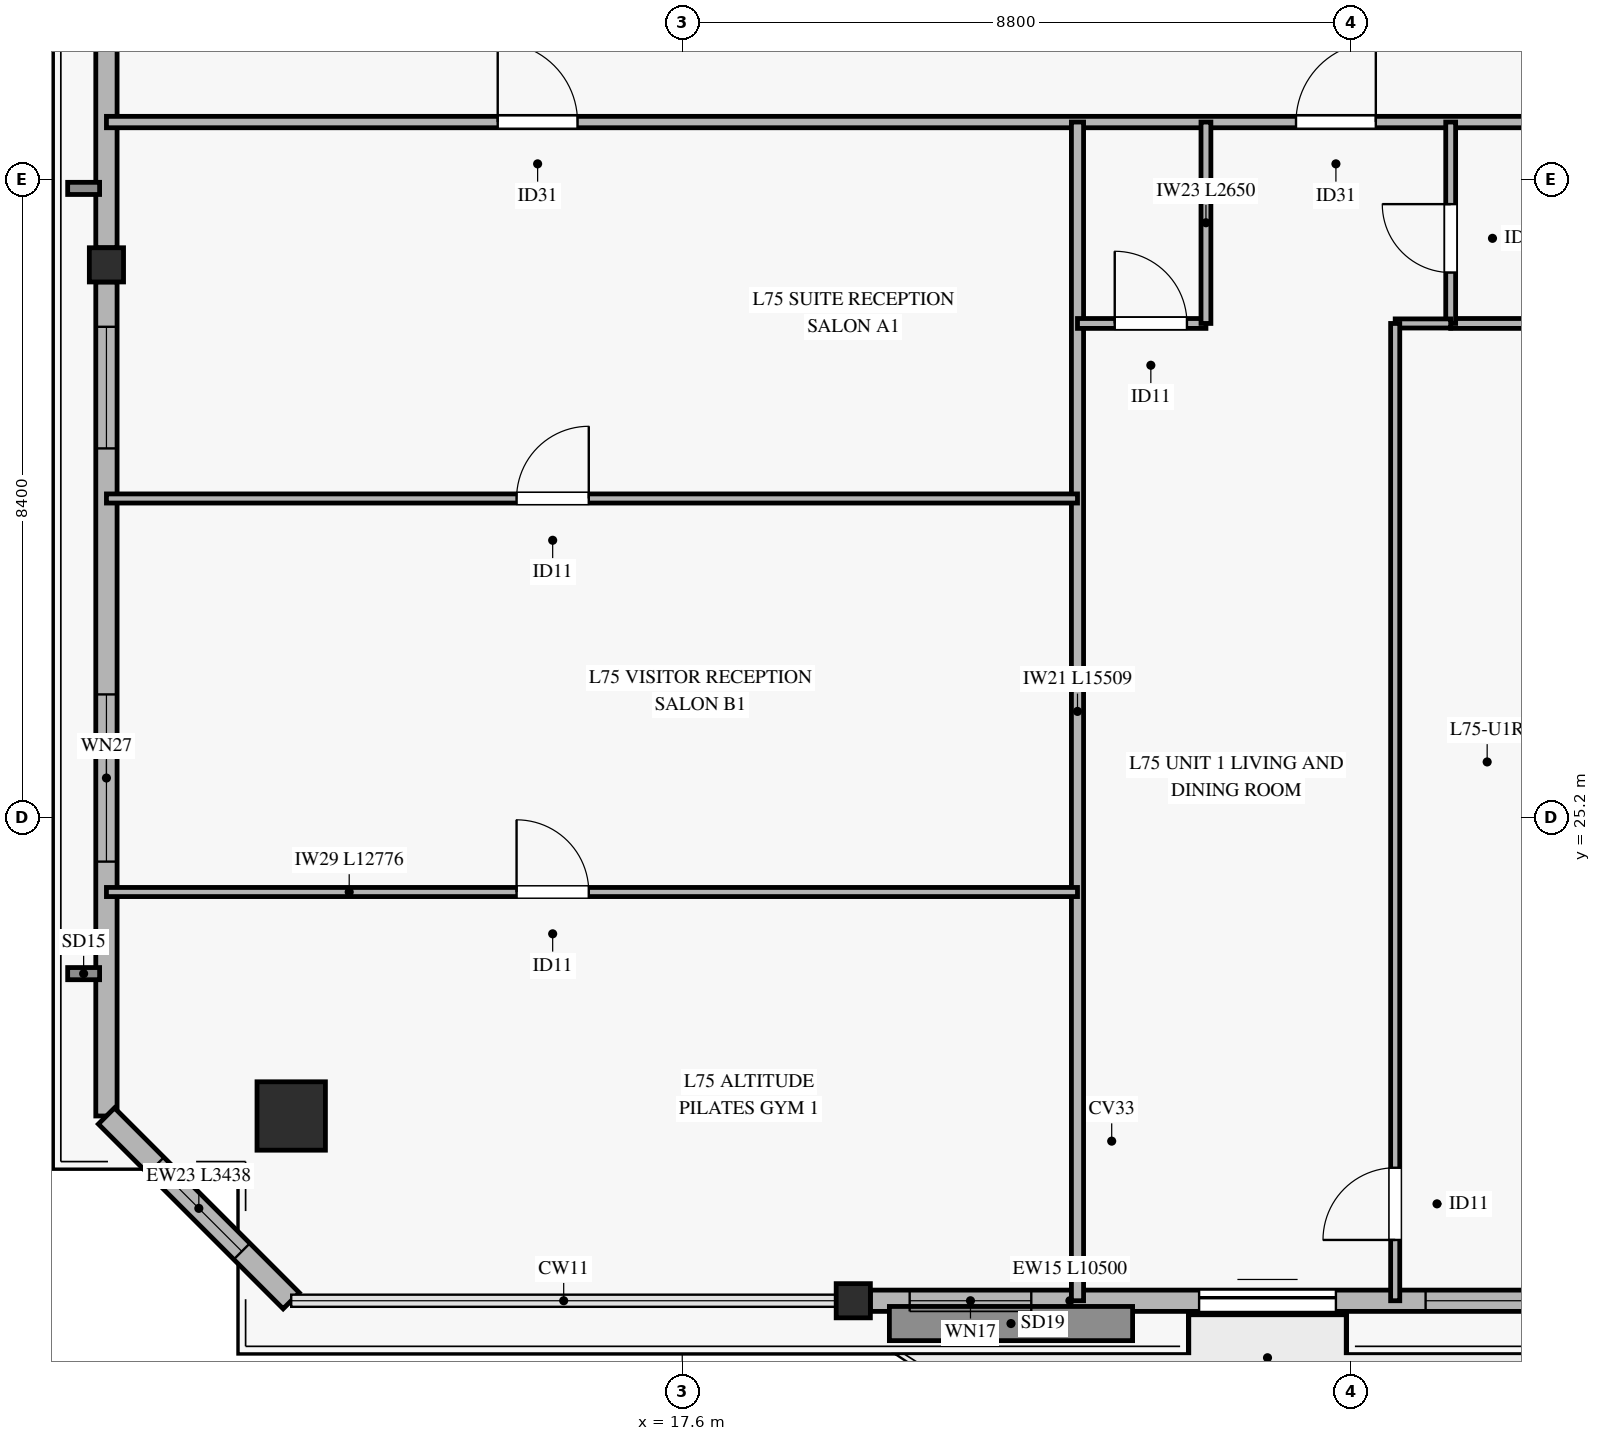
"""IFC4 building model, lengths in metres.
Left out: names, types, materials, properties, quantities, classifications, styles, units other than length and angle.
Written with IfcOpenShell. Run it as: python <this file> out.ifc"""

import sys

from ifc_helpers import new_model, si_unit, direction, frame, frame_2d, origin, origin_2d, place, context, subcontext, project, spatial, rectangle, hollow_rectangle, extrude, source, transform, mapped, element, fill, save


model = new_model("IFC4")
c1 = context("Model", 3, precision=1e-05, world=origin(), true_north=direction((0.0, 1.0)))
c2 = subcontext(c1, "Body", "Model", "MODEL_VIEW")
j1 = project(units=[si_unit("LENGTHUNIT", "METRE"), si_unit("PLANEANGLEUNIT", "RADIAN")], contexts=[c1])
p1 = place(None, origin())
s1 = spatial("IfcSite", under=j1, at=p1, CompositionType="ELEMENT")
p2 = place(p1, origin())
s2 = spatial("IfcBuilding", under=s1, at=p2, CompositionType="ELEMENT")
p3 = place(p2, frame((0.0, 0.0, 293.8)))
s3 = spatial("IfcBuildingStorey", under=s2, at=p3, CompositionType="ELEMENT", Elevation=293.8)
m1 = source(origin(), c2, "Body", "SweptSolid", [
    extrude(hollow_rectangle(XDim=0.9, YDim=0.9, WallThickness=0.04, at=origin_2d()), origin(), (0.0, 0.0, 1.0), 3.185),
])
p4 = place(p3, frame((12.455, 21.272, 0.0), z_axis=(0.0, 0.0, 1.0), x_axis=(1.0, 0.0, 0.0)))
e1 = element("IfcColumn", 1, at=p4, inside=s3, PredefinedType="COLUMN", context=c2, shape_type="MappedRepresentation", body=[
    mapped(m1, transform((0.0, 0.0, 0.0), x_axis=(1.0, 0.0, 0.0), y_axis=(0.0, 1.0, 0.0), z_axis=(0.0, 0.0, 1.0), scale=1.0)),
])
m2 = source(origin(), c2, "Body", "SweptSolid", [
    extrude(hollow_rectangle(XDim=0.45, YDim=0.45, WallThickness=0.022, at=origin_2d()), origin(), (0.0, 0.0, 1.0), 3.185),
])
for number, where, z_axis, x_axis in (
    (2, (19.85, 18.841, 0.0), (0.0, 0.0, 1.0), (1.0, 0.0, 0.0)),
    (3, (10.024, 32.471, 0.0), (0.0, 0.0, 1.0), (1.0, 0.0, 0.0)),
):
    element("IfcColumn", number, at=place(p3, frame(where, z_axis=z_axis, x_axis=x_axis)), inside=s3, PredefinedType="COLUMN", context=c2, shape_type="MappedRepresentation", body=[
        mapped(m2, transform((0.0, 0.0, 0.0), x_axis=(1.0, 0.0, 0.0), y_axis=(0.0, 1.0, 0.0), z_axis=(0.0, 0.0, 1.0), scale=1.0)),
    ])
p5 = place(p3, frame((20.075, 18.841, 0.0), z_axis=(0.0, 0.0, 1.0), x_axis=(1.0, 0.0, 0.0)))
e4 = element("IfcWall", 4, at=p5, inside=s3, PredefinedType="SOLIDWALL", context=c2, shape_type="SweptSolid", body=[
    extrude(rectangle(XDim=10.5, YDim=0.28, at=frame_2d((5.25, 0.0))), origin(), (0.0, 0.0, 1.0), 2.815),
])
p6 = place(p5, frame((4.325, 0.0, 0.0)))
e5 = element("IfcOpeningElement", 5, at=p6, cuts=e4, PredefinedType="OPENING", context=c2, shape_type="SweptSolid", body=[
    extrude(rectangle(XDim=1.8, YDim=2.25, at=frame_2d((0.9, 1.125))), frame((0.0, 0.15, 0.0), z_axis=(0.0, -1.0, 0.0), x_axis=(1.0, 0.0, 0.0)), (0.0, 0.0, 1.0), 0.3),
])
p7 = place(p5, frame((0.517, 0.0, 0.45)))
e6 = element("IfcOpeningElement", 6, at=p7, cuts=e4, PredefinedType="OPENING", context=c2, shape_type="SweptSolid", body=[
    extrude(rectangle(XDim=1.6, YDim=2.0, at=frame_2d((0.8, 1.0))), frame((0.0, 0.15, 0.0), z_axis=(0.0, -1.0, 0.0), x_axis=(1.0, 0.0, 0.0)), (0.0, 0.0, 1.0), 0.3),
])
p8 = place(p5, frame((7.305, 0.0, 0.45)))
e7 = element("IfcOpeningElement", 7, at=p8, cuts=e4, PredefinedType="OPENING", context=c2, shape_type="SweptSolid", body=[
    extrude(rectangle(XDim=1.6, YDim=2.0, at=frame_2d((0.8, 1.0))), frame((0.0, 0.15, 0.0), z_axis=(0.0, -1.0, 0.0), x_axis=(1.0, 0.0, 0.0)), (0.0, 0.0, 1.0), 0.3),
])
p9 = place(p3, frame((10.024, 21.272, 0.0), z_axis=(0.0, 0.0, 1.0), x_axis=(0.0, 1.0, 0.0)))
e8 = element("IfcWall", 8, at=p9, inside=s3, PredefinedType="SOLIDWALL", context=c2, shape_type="SweptSolid", body=[
    extrude(rectangle(XDim=10.974, YDim=0.28, at=frame_2d((5.487, 0.0))), origin(), (0.0, 0.0, 1.0), 2.815),
])
p10 = place(p9, frame((3.347, 0.0, 0.45)))
e9 = element("IfcOpeningElement", 9, at=p10, cuts=e8, PredefinedType="OPENING", context=c2, shape_type="SweptSolid", body=[
    extrude(rectangle(XDim=2.2, YDim=2.1, at=frame_2d((1.1, 1.05))), frame((0.0, 0.15, 0.0), z_axis=(0.0, -1.0, 0.0), x_axis=(1.0, 0.0, 0.0)), (0.0, 0.0, 1.0), 0.3),
])
p11 = place(p9, frame((8.784, 0.0, 0.45)))
e10 = element("IfcOpeningElement", 10, at=p11, cuts=e8, PredefinedType="OPENING", context=c2, shape_type="SweptSolid", body=[
    extrude(rectangle(XDim=1.6, YDim=2.0, at=frame_2d((0.8, 1.0))), frame((0.0, 0.15, 0.0), z_axis=(0.0, -1.0, 0.0), x_axis=(1.0, 0.0, 0.0)), (0.0, 0.0, 1.0), 0.3),
])
p12 = place(p3, frame((10.024, 32.696, 0.0), z_axis=(0.0, 0.0, 1.0), x_axis=(0.0, 1.0, 0.0)))
e11 = element("IfcWall", 11, at=p12, inside=s3, PredefinedType="SOLIDWALL", context=c2, shape_type="SweptSolid", body=[
    extrude(rectangle(XDim=10.973, YDim=0.28, at=frame_2d((5.486, 0.0))), origin(), (0.0, 0.0, 1.0), 2.815),
])
p13 = place(p3, frame((10.024, 21.272, 0.0), z_axis=(0.0, 0.0, 1.0), x_axis=(0.707142286536, -0.707071274055, 0.0)))
e12 = element("IfcWall", 12, at=p13, inside=s3, PredefinedType="SOLIDWALL", context=c2, shape_type="SweptSolid", body=[
    extrude(rectangle(XDim=3.438, YDim=0.3, at=frame_2d((1.719, 0.0))), origin(), (0.0, 0.0, 1.0), 2.815),
])
p14 = place(p13, frame((0.919, 0.0, 0.45)))
e13 = element("IfcOpeningElement", 13, at=p14, cuts=e12, PredefinedType="OPENING", context=c2, shape_type="SweptSolid", body=[
    extrude(rectangle(XDim=1.6, YDim=2.0, at=frame_2d((0.8, 1.0))), frame((0.0, 0.16, 0.0), z_axis=(0.0, -1.0, 0.0), x_axis=(1.0, 0.0, 0.0)), (0.0, 0.0, 1.0), 0.32),
])
p15 = place(p3, frame((10.024, 34.35, 0.0), z_axis=(0.0, 0.0, 1.0), x_axis=(1.0, 0.0, 0.0)))
e14 = element("IfcWall", 14, at=p15, inside=s3, PredefinedType="PARTITIONING", context=c2, shape_type="SweptSolid", body=[
    extrude(rectangle(XDim=50.352, YDim=0.15, at=frame_2d((25.176, 0.0))), origin(), (0.0, 0.0, 1.0), 2.47),
])
p16 = place(p15, frame((5.148, 0.0, 0.0)))
e15 = element("IfcOpeningElement", 15, at=p16, cuts=e14, PredefinedType="OPENING", context=c2, shape_type="SweptSolid", body=[
    extrude(rectangle(XDim=1.05, YDim=2.15, at=frame_2d((0.525, 1.075))), frame((0.0, 0.085, 0.0), z_axis=(0.0, -1.0, 0.0), x_axis=(1.0, 0.0, 0.0)), (0.0, 0.0, 1.0), 0.17),
])
p17 = place(p15, frame((15.651, 0.0, 0.0)))
e16 = element("IfcOpeningElement", 16, at=p17, cuts=e14, PredefinedType="OPENING", context=c2, shape_type="SweptSolid", body=[
    extrude(rectangle(XDim=1.05, YDim=2.15, at=frame_2d((0.525, 1.075))), frame((0.0, 0.085, 0.0), z_axis=(0.0, -1.0, 0.0), x_axis=(1.0, 0.0, 0.0)), (0.0, 0.0, 1.0), 0.17),
])
p18 = place(p15, frame((22.129, 0.0, 0.0)))
e17 = element("IfcOpeningElement", 17, at=p18, cuts=e14, PredefinedType="OPENING", context=c2, shape_type="SweptSolid", body=[
    extrude(rectangle(XDim=1.05, YDim=2.15, at=frame_2d((0.525, 1.075))), frame((0.0, 0.085, 0.0), z_axis=(0.0, -1.0, 0.0), x_axis=(1.0, 0.0, 0.0)), (0.0, 0.0, 1.0), 0.17),
])
p19 = place(p15, frame((29.151, 0.0, 0.0)))
e18 = element("IfcOpeningElement", 18, at=p19, cuts=e14, PredefinedType="OPENING", context=c2, shape_type="SweptSolid", body=[
    extrude(rectangle(XDim=1.05, YDim=2.15, at=frame_2d((0.525, 1.075))), frame((0.0, 0.085, 0.0), z_axis=(0.0, -1.0, 0.0), x_axis=(1.0, 0.0, 0.0)), (0.0, 0.0, 1.0), 0.17),
])
p20 = place(p15, frame((35.701, 0.0, 0.0)))
e19 = element("IfcOpeningElement", 19, at=p20, cuts=e14, PredefinedType="OPENING", context=c2, shape_type="SweptSolid", body=[
    extrude(rectangle(XDim=1.05, YDim=2.15, at=frame_2d((0.525, 1.075))), frame((0.0, 0.085, 0.0), z_axis=(0.0, -1.0, 0.0), x_axis=(1.0, 0.0, 0.0)), (0.0, 0.0, 1.0), 0.17),
])
p21 = place(p15, frame((43.578, 0.0, 0.0)))
e20 = element("IfcOpeningElement", 20, at=p21, cuts=e14, PredefinedType="OPENING", context=c2, shape_type="SweptSolid", body=[
    extrude(rectangle(XDim=1.05, YDim=2.15, at=frame_2d((0.525, 1.075))), frame((0.0, 0.085, 0.0), z_axis=(0.0, -1.0, 0.0), x_axis=(1.0, 0.0, 0.0)), (0.0, 0.0, 1.0), 0.17),
])
p22 = place(p3, frame((22.8, 18.841, 0.0), z_axis=(0.0, 0.0, 1.0), x_axis=(0.0, 1.0, 0.0)))
e21 = element("IfcWall", 21, at=p22, inside=s3, PredefinedType="PARTITIONING", context=c2, shape_type="SweptSolid", body=[
    extrude(rectangle(XDim=15.509, YDim=0.16, at=frame_2d((7.754, 0.0))), origin(), (0.0, 0.0, 1.0), 2.77),
])
p23 = place(p3, frame((10.024, 24.219, 0.0), z_axis=(0.0, 0.0, 1.0), x_axis=(1.0, 0.0, 0.0)))
e22 = element("IfcWall", 22, at=p23, inside=s3, PredefinedType="PARTITIONING", context=c2, shape_type="SweptSolid", body=[
    extrude(rectangle(XDim=12.776, YDim=0.12, at=frame_2d((6.388, 0.0))), origin(), (0.0, 0.0, 1.0), 2.47),
])
p24 = place(p23, frame((5.396, 0.0, 0.0)))
e23 = element("IfcOpeningElement", 23, at=p24, cuts=e22, PredefinedType="OPENING", context=c2, shape_type="SweptSolid", body=[
    extrude(rectangle(XDim=0.95, YDim=2.1, at=frame_2d((0.475, 1.05))), frame((0.0, 0.07, 0.0), z_axis=(0.0, -1.0, 0.0), x_axis=(1.0, 0.0, 0.0)), (0.0, 0.0, 1.0), 0.14),
])
p25 = place(p3, frame((10.024, 29.397, 0.0), z_axis=(0.0, 0.0, 1.0), x_axis=(1.0, 0.0, 0.0)))
e24 = element("IfcWall", 24, at=p25, inside=s3, PredefinedType="PARTITIONING", context=c2, shape_type="SweptSolid", body=[
    extrude(rectangle(XDim=12.776, YDim=0.12, at=frame_2d((6.388, 0.0))), origin(), (0.0, 0.0, 1.0), 2.47),
])
p26 = place(p25, frame((5.396, 0.0, 0.0)))
e25 = element("IfcOpeningElement", 25, at=p26, cuts=e24, PredefinedType="OPENING", context=c2, shape_type="SweptSolid", body=[
    extrude(rectangle(XDim=0.95, YDim=2.1, at=frame_2d((0.475, 1.05))), frame((0.0, 0.07, 0.0), z_axis=(0.0, -1.0, 0.0), x_axis=(1.0, 0.0, 0.0)), (0.0, 0.0, 1.0), 0.14),
])
p27 = place(p3, frame((22.8, 31.7, 0.0), z_axis=(0.0, 0.0, 1.0), x_axis=(1.0, 0.0, 0.0)))
e26 = element("IfcWall", 26, at=p27, inside=s3, PredefinedType="PARTITIONING", context=c2, shape_type="SweptSolid", body=[
    extrude(rectangle(XDim=1.69, YDim=0.13, at=frame_2d((0.845, 0.0))), origin(), (0.0, 0.0, 1.0), 3.185),
])
p28 = place(p27, frame((0.49, 0.0, 0.0)))
e27 = element("IfcOpeningElement", 27, at=p28, cuts=e26, PredefinedType="OPENING", context=c2, shape_type="SweptSolid", body=[
    extrude(rectangle(XDim=0.95, YDim=2.1, at=frame_2d((0.475, 1.05))), frame((0.0, 0.075, 0.0), z_axis=(0.0, -1.0, 0.0), x_axis=(1.0, 0.0, 0.0)), (0.0, 0.0, 1.0), 0.15),
])
p29 = place(p3, frame((24.49, 31.7, 0.0), z_axis=(0.0, 0.0, 1.0), x_axis=(0.0, 1.0, 0.0)))
e28 = element("IfcWall", 28, at=p29, inside=s3, PredefinedType="PARTITIONING", context=c2, shape_type="SweptSolid", body=[
    extrude(rectangle(XDim=2.65, YDim=0.13, at=frame_2d((1.325, 0.0))), origin(), (0.0, 0.0, 1.0), 2.77),
])
p30 = place(p3, frame((27.71, 31.7, 0.0), z_axis=(0.0, 0.0, 1.0), x_axis=(1.0, 0.0, 0.0)))
e29 = element("IfcWall", 29, at=p30, inside=s3, PredefinedType="PARTITIONING", context=c2, shape_type="SweptSolid", body=[
    extrude(rectangle(XDim=1.69, YDim=0.13, at=frame_2d((0.845, 0.0))), origin(), (0.0, 0.0, 1.0), 3.185),
])
p31 = place(p3, frame((27.71, 31.7, 0.0), z_axis=(0.0, 0.0, 1.0), x_axis=(0.0, 1.0, 0.0)))
e30 = element("IfcWall", 30, at=p31, inside=s3, PredefinedType="PARTITIONING", context=c2, shape_type="SweptSolid", body=[
    extrude(rectangle(XDim=2.65, YDim=0.13, at=frame_2d((1.325, 0.0))), origin(), (0.0, 0.0, 1.0), 2.77),
])
p32 = place(p31, frame((0.67, 0.0, 0.0)))
e31 = element("IfcOpeningElement", 31, at=p32, cuts=e30, PredefinedType="OPENING", context=c2, shape_type="SweptSolid", body=[
    extrude(rectangle(XDim=0.9, YDim=2.1, at=frame_2d((0.45, 1.05))), frame((0.0, 0.075, 0.0), z_axis=(0.0, -1.0, 0.0), x_axis=(1.0, 0.0, 0.0)), (0.0, 0.0, 1.0), 0.15),
])
p33 = place(p3, frame((26.98, 31.7, 0.0), z_axis=(0.0, 0.0, 1.0), x_axis=(1.0, 0.0, 0.0)))
e32 = element("IfcWall", 32, at=p33, inside=s3, PredefinedType="PARTITIONING", context=c2, shape_type="SweptSolid", body=[
    extrude(rectangle(XDim=0.73, YDim=0.12, at=frame_2d((0.365, 0.0))), origin(), (0.0, 0.0, 1.0), 3.185),
])
p34 = place(p3, frame((26.98, 18.841, 0.0), z_axis=(0.0, 0.0, 1.0), x_axis=(0.0, 1.0, 0.0)))
e33 = element("IfcWall", 33, at=p34, inside=s3, PredefinedType="PARTITIONING", context=c2, shape_type="SweptSolid", body=[
    extrude(rectangle(XDim=12.859, YDim=0.12, at=frame_2d((6.429, 0.0))), origin(), (0.0, 0.0, 1.0), 2.77),
])
p35 = place(p34, frame((0.8, 0.0, 0.0)))
e34 = element("IfcOpeningElement", 34, at=p35, cuts=e33, PredefinedType="OPENING", context=c2, shape_type="SweptSolid", body=[
    extrude(rectangle(XDim=0.95, YDim=2.1, at=frame_2d((0.475, 1.05))), frame((0.0, 0.07, 0.0), z_axis=(0.0, -1.0, 0.0), x_axis=(1.0, 0.0, 0.0)), (0.0, 0.0, 1.0), 0.14),
])
m3 = source(origin(), c2, "Body", "SweptSolid", [
    extrude(rectangle(XDim=1.8, YDim=2.25, at=frame_2d((0.9, 1.125))), frame((0.0, 0.025, 0.0), z_axis=(0.0, -1.0, 0.0), x_axis=(1.0, 0.0, 0.0)), (0.0, 0.0, 1.0), 0.05),
])
p36 = place(p6, origin())
e35 = element("IfcDoor", 35, at=p36, inside=s3, OperationType="SLIDING_TO_LEFT", PredefinedType="DOOR", context=c2, shape_type="MappedRepresentation", body=[
    mapped(m3, transform((0.0, 0.0, 0.0), x_axis=(1.0, 0.0, 0.0), y_axis=(0.0, 1.0, 0.0), z_axis=(0.0, 0.0, 1.0), scale=1.0)),
])
fill(e5, e35)
m4 = source(origin(), c2, "Body", "SweptSolid", [
    extrude(rectangle(XDim=1.6, YDim=2.0, at=frame_2d((0.8, 1.0))), frame((0.0, 0.03, 0.0), z_axis=(0.0, -1.0, 0.0), x_axis=(1.0, 0.0, 0.0)), (0.0, 0.0, 1.0), 0.06),
])
p37 = place(p7, origin())
e36 = element("IfcWindow", 36, at=p37, inside=s3, PartitioningType="SINGLE_PANEL", PredefinedType="WINDOW", context=c2, shape_type="MappedRepresentation", body=[
    mapped(m4, transform((0.0, 0.0, 0.0), x_axis=(1.0, 0.0, 0.0), y_axis=(0.0, 1.0, 0.0), z_axis=(0.0, 0.0, 1.0), scale=1.0)),
])
fill(e6, e36)
p38 = place(p8, origin())
e37 = element("IfcWindow", 37, at=p38, inside=s3, PartitioningType="SINGLE_PANEL", PredefinedType="WINDOW", context=c2, shape_type="MappedRepresentation", body=[
    mapped(m4, transform((0.0, 0.0, 0.0), x_axis=(1.0, 0.0, 0.0), y_axis=(0.0, 1.0, 0.0), z_axis=(0.0, 0.0, 1.0), scale=1.0)),
])
fill(e7, e37)
m5 = source(origin(), c2, "Body", "SweptSolid", [
    extrude(rectangle(XDim=2.2, YDim=2.1, at=frame_2d((1.1, 1.05))), frame((0.0, 0.03, 0.0), z_axis=(0.0, -1.0, 0.0), x_axis=(1.0, 0.0, 0.0)), (0.0, 0.0, 1.0), 0.06),
])
p39 = place(p10, origin())
e38 = element("IfcWindow", 38, at=p39, inside=s3, PartitioningType="SINGLE_PANEL", PredefinedType="WINDOW", context=c2, shape_type="MappedRepresentation", body=[
    mapped(m5, transform((0.0, 0.0, 0.0), x_axis=(1.0, 0.0, 0.0), y_axis=(0.0, 1.0, 0.0), z_axis=(0.0, 0.0, 1.0), scale=1.0)),
])
fill(e9, e38)
p40 = place(p11, origin())
e39 = element("IfcWindow", 39, at=p40, inside=s3, PartitioningType="SINGLE_PANEL", PredefinedType="WINDOW", context=c2, shape_type="MappedRepresentation", body=[
    mapped(m4, transform((0.0, 0.0, 0.0), x_axis=(1.0, 0.0, 0.0), y_axis=(0.0, 1.0, 0.0), z_axis=(0.0, 0.0, 1.0), scale=1.0)),
])
fill(e10, e39)
p41 = place(p14, origin())
e40 = element("IfcWindow", 40, at=p41, inside=s3, PartitioningType="SINGLE_PANEL", PredefinedType="WINDOW", context=c2, shape_type="MappedRepresentation", body=[
    mapped(m4, transform((0.0, 0.0, 0.0), x_axis=(1.0, 0.0, 0.0), y_axis=(0.0, 1.0, 0.0), z_axis=(0.0, 0.0, 1.0), scale=1.0)),
])
fill(e13, e40)
m6 = source(origin(), c2, "Body", "SweptSolid", [
    extrude(rectangle(XDim=1.05, YDim=2.15, at=frame_2d((0.525, 1.075))), frame((0.0, 0.025, 0.0), z_axis=(0.0, -1.0, 0.0), x_axis=(1.0, 0.0, 0.0)), (0.0, 0.0, 1.0), 0.05),
])
p42 = place(p16, origin())
e41 = element("IfcDoor", 41, at=p42, inside=s3, OperationType="SINGLE_SWING_LEFT", PredefinedType="DOOR", context=c2, shape_type="MappedRepresentation", body=[
    mapped(m6, transform((0.0, 0.0, 0.0), x_axis=(1.0, 0.0, 0.0), y_axis=(0.0, 1.0, 0.0), z_axis=(0.0, 0.0, 1.0), scale=1.0)),
])
fill(e15, e41)
m7 = source(origin(), c2, "Body", "SweptSolid", [
    extrude(rectangle(XDim=0.95, YDim=2.1, at=frame_2d((0.475, 1.05))), frame((0.0, 0.025, 0.0), z_axis=(0.0, -1.0, 0.0), x_axis=(1.0, 0.0, 0.0)), (0.0, 0.0, 1.0), 0.05),
])
p43 = place(p26, origin())
e42 = element("IfcDoor", 42, at=p43, inside=s3, OperationType="SINGLE_SWING_RIGHT", PredefinedType="DOOR", context=c2, shape_type="MappedRepresentation", body=[
    mapped(m7, transform((0.0, 0.0, 0.0), x_axis=(1.0, 0.0, 0.0), y_axis=(0.0, 1.0, 0.0), z_axis=(0.0, 0.0, 1.0), scale=1.0)),
])
fill(e25, e42)
p44 = place(p24, origin())
e43 = element("IfcDoor", 43, at=p44, inside=s3, OperationType="SINGLE_SWING_LEFT", PredefinedType="DOOR", context=c2, shape_type="MappedRepresentation", body=[
    mapped(m7, transform((0.0, 0.0, 0.0), x_axis=(1.0, 0.0, 0.0), y_axis=(0.0, 1.0, 0.0), z_axis=(0.0, 0.0, 1.0), scale=1.0)),
])
fill(e23, e43)
p45 = place(p17, origin())
e44 = element("IfcDoor", 44, at=p45, inside=s3, OperationType="SINGLE_SWING_RIGHT", PredefinedType="DOOR", context=c2, shape_type="MappedRepresentation", body=[
    mapped(m6, transform((0.0, 0.0, 0.0), x_axis=(1.0, 0.0, 0.0), y_axis=(0.0, 1.0, 0.0), z_axis=(0.0, 0.0, 1.0), scale=1.0)),
])
fill(e16, e44)
p46 = place(p28, origin())
e45 = element("IfcDoor", 45, at=p46, inside=s3, OperationType="SINGLE_SWING_LEFT", PredefinedType="DOOR", context=c2, shape_type="MappedRepresentation", body=[
    mapped(m7, transform((0.0, 0.0, 0.0), x_axis=(1.0, 0.0, 0.0), y_axis=(0.0, 1.0, 0.0), z_axis=(0.0, 0.0, 1.0), scale=1.0)),
])
fill(e27, e45)
m8 = source(origin(), c2, "Body", "SweptSolid", [
    extrude(rectangle(XDim=0.9, YDim=2.1, at=frame_2d((0.45, 1.05))), frame((0.0, 0.025, 0.0), z_axis=(0.0, -1.0, 0.0), x_axis=(1.0, 0.0, 0.0)), (0.0, 0.0, 1.0), 0.05),
])
p47 = place(p32, origin())
e46 = element("IfcDoor", 46, at=p47, inside=s3, OperationType="SINGLE_SWING_RIGHT", PredefinedType="DOOR", context=c2, shape_type="MappedRepresentation", body=[
    mapped(m8, transform((0.0, 0.0, 0.0), x_axis=(1.0, 0.0, 0.0), y_axis=(0.0, 1.0, 0.0), z_axis=(0.0, 0.0, 1.0), scale=1.0)),
])
fill(e31, e46)
p48 = place(p35, origin())
e47 = element("IfcDoor", 47, at=p48, inside=s3, OperationType="SINGLE_SWING_LEFT", PredefinedType="DOOR", context=c2, shape_type="MappedRepresentation", body=[
    mapped(m7, transform((0.0, 0.0, 0.0), x_axis=(1.0, 0.0, 0.0), y_axis=(0.0, 1.0, 0.0), z_axis=(0.0, 0.0, 1.0), scale=1.0)),
])
fill(e34, e47)
save(model, sys.argv[1])
